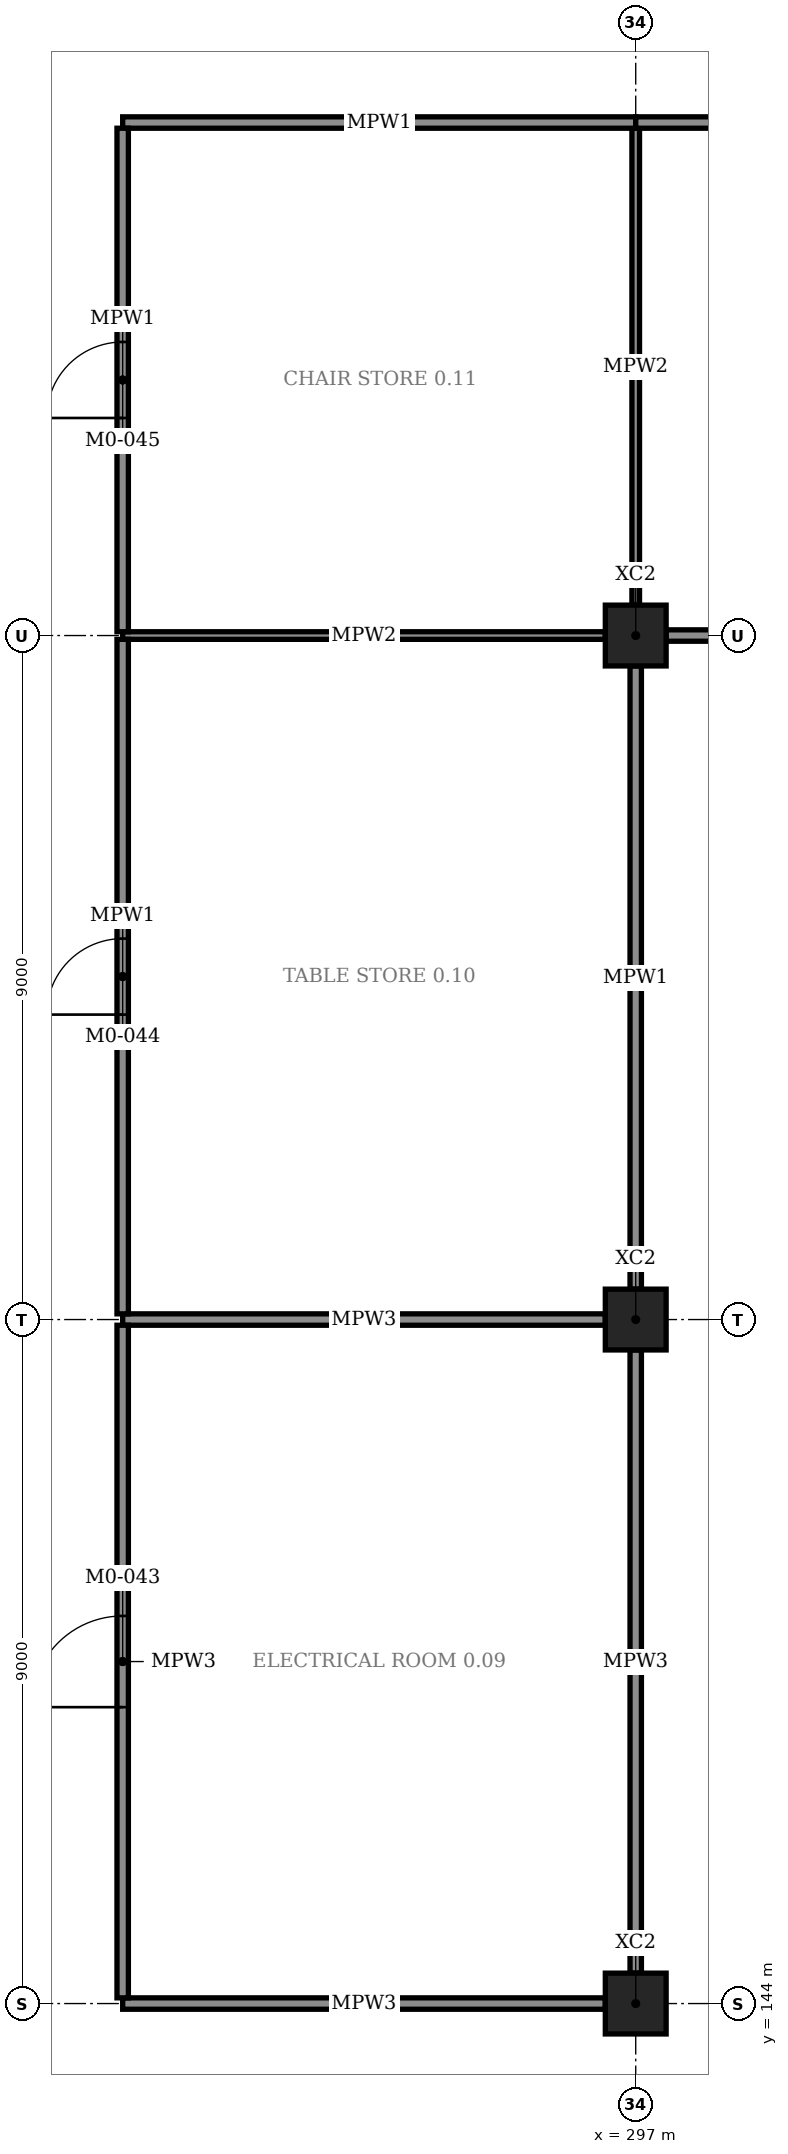
"""IFC4 building model, lengths in metres.
Left out: names, types, materials, properties, quantities, classifications, styles, units other than length and angle.
Written with IfcOpenShell. Run it as: python <this file> out.ifc"""

import sys

from ifc_helpers import new_model, si_unit, direction, frame, frame_2d, origin, origin_2d, place, context, subcontext, project, spatial, rectangle, extrude, element, fill, save


model = new_model("IFC4")
c1 = context("Model", 3, precision=1e-05, world=origin(), true_north=direction((0.0, 1.0)))
c2 = subcontext(c1, "Body", "Model", "MODEL_VIEW")
j1 = project(units=[si_unit("LENGTHUNIT", "METRE"), si_unit("PLANEANGLEUNIT", "RADIAN")], contexts=[c1])
p1 = place(None, origin())
s1 = spatial("IfcSite", under=j1, at=p1, CompositionType="ELEMENT")
p2 = place(p1, origin())
s2 = spatial("IfcBuilding", under=s1, at=p2, CompositionType="ELEMENT")
p3 = place(p2, origin())
s3 = spatial("IfcBuildingStorey", under=s2, at=p3, CompositionType="ELEMENT", Elevation=0.0)
for number, where, z_axis, x_axis in (
    (1, (297.0, 144.0, -0.3), (0.0, 0.0, 1.0), (1.0, 0.0, 0.0)),
    (2, (297.0, 153.0, -0.3), (0.0, 0.0, 1.0), (1.0, 0.0, 0.0)),
    (3, (297.0, 162.0, -0.3), (0.0, 0.0, 1.0), (1.0, 0.0, 0.0)),
):
    element("IfcColumn", number, at=place(p3, frame(where, z_axis=z_axis, x_axis=x_axis)), inside=s3, PredefinedType="COLUMN", context=c2, shape_type="SweptSolid", body=[
        extrude(rectangle(XDim=0.8, YDim=0.8, at=origin_2d()), origin(), (0.0, 0.0, 1.0), 6.3),
    ])
for number, where, z_axis, x_axis in (
    (4, (290.25, 144.0, 0.0), (0.0, 0.0, 1.0), (1.0, 0.0, 0.0)),
    (5, (290.25, 153.0, 0.0), (0.0, 0.0, 1.0), (1.0, 0.0, 0.0)),
):
    element("IfcWall", number, at=place(p3, frame(where, z_axis=z_axis, x_axis=x_axis)), inside=s3, PredefinedType="PARTITIONING", context=c2, shape_type="SweptSolid", body=[
        extrude(rectangle(XDim=6.35, YDim=0.15, at=frame_2d((3.175, 0.0))), origin(), (0.0, 0.0, 1.0), 4.82),
    ])
p4 = place(p3, frame((290.25, 144.075, 0.0), z_axis=(0.0, 0.0, 1.0), x_axis=(0.0, 1.0, 0.0)))
e6 = element("IfcWall", 6, at=p4, inside=s3, PredefinedType="PARTITIONING", context=c2, shape_type="SweptSolid", body=[
    extrude(rectangle(XDim=8.85, YDim=0.15, at=frame_2d((4.425, 0.0))), origin(), (0.0, 0.0, 1.0), 4.82),
])
p5 = place(p4, frame((3.825, 0.0, 0.0)))
e7 = element("IfcOpeningElement", 7, at=p5, cuts=e6, PredefinedType="OPENING", context=c2, shape_type="SweptSolid", body=[
    extrude(rectangle(XDim=1.2, YDim=2.4, at=frame_2d((0.6, 1.2))), frame((0.0, 0.085, 0.0), z_axis=(0.0, -1.0, 0.0), x_axis=(1.0, 0.0, 0.0)), (0.0, 0.0, 1.0), 0.17),
])
p6 = place(p3, frame((297.0, 144.4, 0.0), z_axis=(0.0, 0.0, 1.0), x_axis=(0.0, 1.0, 0.0)))
e8 = element("IfcWall", 8, at=p6, inside=s3, PredefinedType="PARTITIONING", context=c2, shape_type="SweptSolid", body=[
    extrude(rectangle(XDim=8.2, YDim=0.15, at=frame_2d((4.1, 0.0))), origin(), (0.0, 0.0, 1.0), 4.82),
])
p7 = place(p3, frame((290.25, 162.0, 0.0), z_axis=(0.0, 0.0, 1.0), x_axis=(1.0, 0.0, 0.0)))
e9 = element("IfcWall", 9, at=p7, inside=s3, PredefinedType="PARTITIONING", context=c2, shape_type="SweptSolid", body=[
    extrude(rectangle(XDim=6.35, YDim=0.1, at=frame_2d((3.175, 0.0))), origin(), (0.0, 0.0, 1.0), 4.82),
])
p8 = place(p3, frame((290.25, 153.075, 0.0), z_axis=(0.0, 0.0, 1.0), x_axis=(0.0, 1.0, 0.0)))
e10 = element("IfcWall", 10, at=p8, inside=s3, PredefinedType="PARTITIONING", context=c2, shape_type="SweptSolid", body=[
    extrude(rectangle(XDim=8.875, YDim=0.15, at=frame_2d((4.438, 0.0))), origin(), (0.0, 0.0, 1.0), 4.82),
])
p9 = place(p8, frame((3.938, 0.0, 0.0)))
e11 = element("IfcOpeningElement", 11, at=p9, cuts=e10, PredefinedType="OPENING", context=c2, shape_type="SweptSolid", body=[
    extrude(rectangle(XDim=1.0, YDim=2.4, at=frame_2d((0.5, 1.2))), frame((0.0, 0.085, 0.0), z_axis=(0.0, -1.0, 0.0), x_axis=(1.0, 0.0, 0.0)), (0.0, 0.0, 1.0), 0.17),
])
p10 = place(p3, frame((297.0, 153.4, 0.0), z_axis=(0.0, 0.0, 1.0), x_axis=(0.0, 1.0, 0.0)))
e12 = element("IfcWall", 12, at=p10, inside=s3, PredefinedType="PARTITIONING", context=c2, shape_type="SweptSolid", body=[
    extrude(rectangle(XDim=8.2, YDim=0.15, at=frame_2d((4.1, 0.0))), origin(), (0.0, 0.0, 1.0), 4.82),
])
p11 = place(p3, frame((290.25, 168.75, 0.0), z_axis=(0.0, 0.0, 1.0), x_axis=(1.0, 0.0, 0.0)))
e13 = element("IfcWall", 13, at=p11, inside=s3, PredefinedType="PARTITIONING", context=c2, shape_type="SweptSolid", body=[
    extrude(rectangle(XDim=6.75, YDim=0.15, at=frame_2d((3.375, 0.0))), origin(), (0.0, 0.0, 1.0), 4.82),
])
p12 = place(p3, frame((290.25, 162.05, 0.0), z_axis=(0.0, 0.0, 1.0), x_axis=(0.0, 1.0, 0.0)))
e14 = element("IfcWall", 14, at=p12, inside=s3, PredefinedType="PARTITIONING", context=c2, shape_type="SweptSolid", body=[
    extrude(rectangle(XDim=6.625, YDim=0.15, at=frame_2d((3.312, 0.0))), origin(), (0.0, 0.0, 1.0), 4.82),
])
p13 = place(p12, frame((2.812, 0.0, 0.0)))
e15 = element("IfcOpeningElement", 15, at=p13, cuts=e14, PredefinedType="OPENING", context=c2, shape_type="SweptSolid", body=[
    extrude(rectangle(XDim=1.0, YDim=2.4, at=frame_2d((0.5, 1.2))), frame((0.0, 0.085, 0.0), z_axis=(0.0, -1.0, 0.0), x_axis=(1.0, 0.0, 0.0)), (0.0, 0.0, 1.0), 0.17),
])
p14 = place(p3, frame((297.0, 162.4, 0.0), z_axis=(0.0, 0.0, 1.0), x_axis=(0.0, 1.0, 0.0)))
e16 = element("IfcWall", 16, at=p14, inside=s3, PredefinedType="PARTITIONING", context=c2, shape_type="SweptSolid", body=[
    extrude(rectangle(XDim=6.275, YDim=0.1, at=frame_2d((3.138, 0.0))), origin(), (0.0, 0.0, 1.0), 4.82),
])
p15 = place(p3, frame((297.4, 162.0, 0.0), z_axis=(0.0, 0.0, 1.0), x_axis=(1.0, 0.0, 0.0)))
e17 = element("IfcWall", 17, at=p15, inside=s3, PredefinedType="PARTITIONING", context=c2, shape_type="SweptSolid", body=[
    extrude(rectangle(XDim=8.2, YDim=0.15, at=frame_2d((4.1, 0.0))), origin(), (0.0, 0.0, 1.0), 4.82),
])
p16 = place(p15, frame((3.2, 0.0, 0.0)))
e18 = element("IfcOpeningElement", 18, at=p16, cuts=e17, PredefinedType="OPENING", context=c2, shape_type="SweptSolid", body=[
    extrude(rectangle(XDim=1.8, YDim=2.4, at=frame_2d((0.9, 1.2))), frame((0.0, 0.085, 0.0), z_axis=(0.0, -1.0, 0.0), x_axis=(1.0, 0.0, 0.0)), (0.0, 0.0, 1.0), 0.17),
])
p17 = place(p3, frame((297.0, 168.75, 0.0), z_axis=(0.0, 0.0, 1.0), x_axis=(1.0, 0.0, 0.0)))
e19 = element("IfcWall", 19, at=p17, inside=s3, PredefinedType="PARTITIONING", context=c2, shape_type="SweptSolid", body=[
    extrude(rectangle(XDim=18.0, YDim=0.15, at=frame_2d((9.0, 0.0))), origin(), (0.0, 0.0, 1.0), 4.82),
])
p18 = place(p5, origin())
e20 = element("IfcDoor", 20, at=p18, inside=s3, OperationType="SINGLE_SWING_LEFT", PredefinedType="DOOR", context=c2, shape_type="SweptSolid", body=[
    extrude(rectangle(XDim=1.2, YDim=2.4, at=frame_2d((0.6, 1.2))), frame((0.0, 0.025, 0.0), z_axis=(0.0, -1.0, 0.0), x_axis=(1.0, 0.0, 0.0)), (0.0, 0.0, 1.0), 0.05),
])
fill(e7, e20)
p19 = place(p9, origin())
e21 = element("IfcDoor", 21, at=p19, inside=s3, OperationType="SINGLE_SWING_LEFT", PredefinedType="DOOR", context=c2, shape_type="SweptSolid", body=[
    extrude(rectangle(XDim=1.0, YDim=2.4, at=frame_2d((0.5, 1.2))), frame((0.0, 0.025, 0.0), z_axis=(0.0, -1.0, 0.0), x_axis=(1.0, 0.0, 0.0)), (0.0, 0.0, 1.0), 0.05),
])
fill(e11, e21)
p20 = place(p13, origin())
e22 = element("IfcDoor", 22, at=p20, inside=s3, OperationType="SINGLE_SWING_LEFT", PredefinedType="DOOR", context=c2, shape_type="SweptSolid", body=[
    extrude(rectangle(XDim=1.0, YDim=2.4, at=frame_2d((0.5, 1.2))), frame((0.0, 0.025, 0.0), z_axis=(0.0, -1.0, 0.0), x_axis=(1.0, 0.0, 0.0)), (0.0, 0.0, 1.0), 0.05),
])
fill(e15, e22)
save(model, sys.argv[1])
